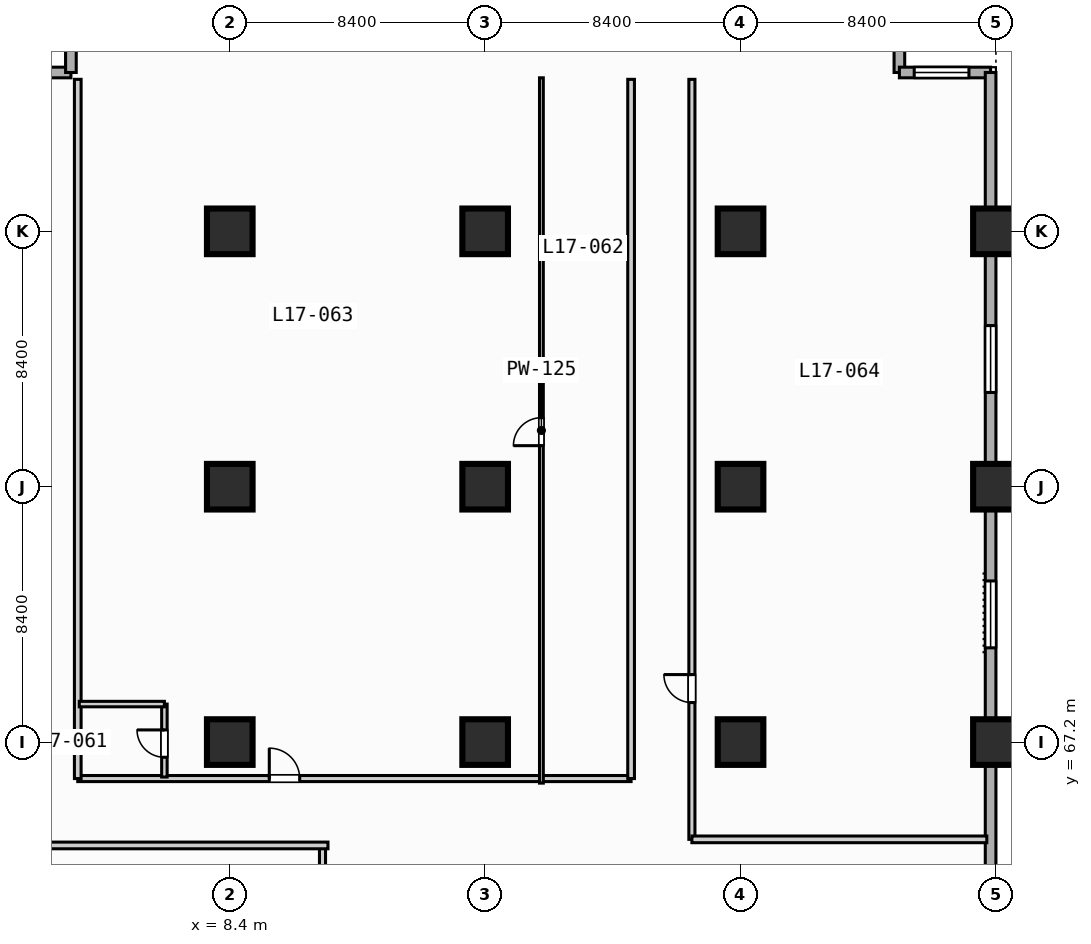
"""IFC4 building model, lengths in metres.
Left out: names, types, materials, properties, quantities, classifications, styles, units other than length and angle.
Written with IfcOpenShell. Run it as: python <this file> out.ifc"""

import sys

from ifc_helpers import new_model, si_unit, direction, frame, frame_2d, origin, origin_2d, place, context, subcontext, project, spatial, rectangle, extrude, element, fill, save


model = new_model("IFC4")
c1 = context("Model", 3, precision=1e-05, world=origin(), true_north=direction((0.0, 1.0)))
c2 = subcontext(c1, "Body", "Model", "MODEL_VIEW")
j1 = project(units=[si_unit("LENGTHUNIT", "METRE"), si_unit("PLANEANGLEUNIT", "RADIAN")], contexts=[c1])
p1 = place(None, origin())
s1 = spatial("IfcSite", under=j1, at=p1, CompositionType="ELEMENT")
p2 = place(p1, origin())
s2 = spatial("IfcBuilding", under=s1, at=p2, CompositionType="ELEMENT")
p3 = place(p2, frame((0.0, 0.0, 73.8)))
s3 = spatial("IfcBuildingStorey", under=s2, at=p3, CompositionType="ELEMENT", Elevation=73.8)
for number, where, z_axis, x_axis in (
    (1, (8.4, 67.2, 0.0), (0.0, 0.0, 1.0), (1.0, 0.0, 0.0)),
    (2, (8.4, 75.6, 0.0), (0.0, 0.0, 1.0), (1.0, 0.0, 0.0)),
    (3, (8.4, 84.0, 0.0), (0.0, 0.0, 1.0), (1.0, 0.0, 0.0)),
    (4, (16.8, 67.2, 0.0), (0.0, 0.0, 1.0), (1.0, 0.0, 0.0)),
    (5, (16.8, 75.6, 0.0), (0.0, 0.0, 1.0), (1.0, 0.0, 0.0)),
    (6, (16.8, 84.0, 0.0), (0.0, 0.0, 1.0), (1.0, 0.0, 0.0)),
    (7, (25.2, 67.2, 0.0), (0.0, 0.0, 1.0), (1.0, 0.0, 0.0)),
    (8, (25.2, 75.6, 0.0), (0.0, 0.0, 1.0), (1.0, 0.0, 0.0)),
    (9, (25.2, 84.0, 0.0), (0.0, 0.0, 1.0), (1.0, 0.0, 0.0)),
    (10, (33.6, 67.2, 0.0), (0.0, 0.0, 1.0), (1.0, 0.0, 0.0)),
    (11, (33.6, 75.6, 0.0), (0.0, 0.0, 1.0), (1.0, 0.0, 0.0)),
    (12, (33.6, 84.0, 0.0), (0.0, 0.0, 1.0), (1.0, 0.0, 0.0)),
):
    element("IfcColumn", number, at=place(p3, frame(where, z_axis=z_axis, x_axis=x_axis)), inside=s3, PredefinedType="COLUMN", context=c2, shape_type="SweptSolid", body=[
        extrude(rectangle(XDim=1.5, YDim=1.5, at=origin_2d()), origin(), (0.0, 0.0, 1.0), 3.8),
    ])
for number, where, z_axis, x_axis in (
    (13, (0.175, 89.225, 0.0), (0.0, 0.0, 1.0), (1.0, 0.0, 0.0)),
    (14, (3.175, 89.225, 0.0), (0.0, 0.0, 1.0), (0.0, 1.0, 0.0)),
    (15, (30.425, 92.225, 0.0), (0.0, 0.0, 1.0), (0.0, -1.0, 0.0)),
):
    element("IfcWall", number, at=place(p3, frame(where, z_axis=z_axis, x_axis=x_axis)), inside=s3, PredefinedType="STANDARD", context=c2, shape_type="SweptSolid", body=[
        extrude(rectangle(XDim=3.0, YDim=0.35, at=frame_2d((1.5, 0.0))), origin(), (0.0, 0.0, 1.0), 3.55),
    ])
p4 = place(p3, frame((30.425, 89.225, 0.0), z_axis=(0.0, 0.0, 1.0), x_axis=(1.0, 0.0, 0.0)))
e16 = element("IfcWall", 16, at=p4, inside=s3, PredefinedType="STANDARD", context=c2, shape_type="SweptSolid", body=[
    extrude(rectangle(XDim=3.0, YDim=0.35, at=frame_2d((1.5, 0.0))), origin(), (0.0, 0.0, 1.0), 3.55),
])
p5 = place(p4, frame((0.488, 0.0, 0.85)))
e17 = element("IfcOpeningElement", 17, at=p5, cuts=e16, PredefinedType="OPENING", context=c2, shape_type="SweptSolid", body=[
    extrude(rectangle(XDim=1.8, YDim=1.8, at=frame_2d((0.9, 0.9))), frame((0.0, 0.185, 0.0), z_axis=(0.0, -1.0, 0.0), x_axis=(1.0, 0.0, 0.0)), (0.0, 0.0, 1.0), 0.37),
])
p6 = place(p3, frame((33.425, 89.225, 0.0), z_axis=(0.0, 0.0, 1.0), x_axis=(0.0, -1.0, 0.0)))
e18 = element("IfcWall", 18, at=p6, inside=s3, PredefinedType="STANDARD", context=c2, shape_type="SweptSolid", body=[
    extrude(rectangle(XDim=55.8, YDim=0.35, at=frame_2d((27.9, 0.0))), origin(), (0.0, 0.0, 1.0), 3.55),
])
p7 = place(p6, frame((16.725, 0.0, 0.85)))
e19 = element("IfcOpeningElement", 19, at=p7, cuts=e18, PredefinedType="OPENING", context=c2, shape_type="SweptSolid", body=[
    extrude(rectangle(XDim=2.2, YDim=1.8, at=frame_2d((1.1, 0.9))), frame((0.0, 0.185, 0.0), z_axis=(0.0, -1.0, 0.0), x_axis=(1.0, 0.0, 0.0)), (0.0, 0.0, 1.0), 0.37),
])
p8 = place(p6, frame((8.325, 0.0, 0.85)))
e20 = element("IfcOpeningElement", 20, at=p8, cuts=e18, PredefinedType="OPENING", context=c2, shape_type="SweptSolid", body=[
    extrude(rectangle(XDim=2.2, YDim=1.8, at=frame_2d((1.1, 0.9))), frame((0.0, 0.185, 0.0), z_axis=(0.0, -1.0, 0.0), x_axis=(1.0, 0.0, 0.0)), (0.0, 0.0, 1.0), 0.37),
])
p9 = place(p3, frame((11.45, 3.4, 0.0), z_axis=(0.0, 0.0, 1.0), x_axis=(0.0, 1.0, 0.0)))
e21 = element("IfcWall", 21, at=p9, inside=s3, PredefinedType="PARTITIONING", context=c2, shape_type="SweptSolid", body=[
    extrude(rectangle(XDim=60.4, YDim=0.2, at=frame_2d((30.2, 0.0))), origin(), (0.0, 0.0, 1.0), 3.55),
])
p10 = place(p9, frame((4.465, 0.0, 0.0)))
e22 = element("IfcOpeningElement", 22, at=p10, cuts=e21, PredefinedType="OPENING", context=c2, shape_type="SweptSolid", body=[
    extrude(rectangle(XDim=1.0, YDim=2.15, at=frame_2d((0.5, 1.075))), frame((0.0, 0.11, 0.0), z_axis=(0.0, -1.0, 0.0), x_axis=(1.0, 0.0, 0.0)), (0.0, 0.0, 1.0), 0.22),
])
p11 = place(p9, frame((14.665, 0.0, 0.0)))
e23 = element("IfcOpeningElement", 23, at=p11, cuts=e21, PredefinedType="OPENING", context=c2, shape_type="SweptSolid", body=[
    extrude(rectangle(XDim=1.0, YDim=2.15, at=frame_2d((0.5, 1.075))), frame((0.0, 0.11, 0.0), z_axis=(0.0, -1.0, 0.0), x_axis=(1.0, 0.0, 0.0)), (0.0, 0.0, 1.0), 0.22),
])
p12 = place(p9, frame((22.535, 0.0, 0.0)))
e24 = element("IfcOpeningElement", 24, at=p12, cuts=e21, PredefinedType="OPENING", context=c2, shape_type="SweptSolid", body=[
    extrude(rectangle(XDim=1.0, YDim=2.15, at=frame_2d((0.5, 1.075))), frame((0.0, 0.11, 0.0), z_axis=(0.0, -1.0, 0.0), x_axis=(1.0, 0.0, 0.0)), (0.0, 0.0, 1.0), 0.22),
])
p13 = place(p9, frame((31.16, 0.0, 0.0)))
e25 = element("IfcOpeningElement", 25, at=p13, cuts=e21, PredefinedType="OPENING", context=c2, shape_type="SweptSolid", body=[
    extrude(rectangle(XDim=1.0, YDim=2.15, at=frame_2d((0.5, 1.075))), frame((0.0, 0.11, 0.0), z_axis=(0.0, -1.0, 0.0), x_axis=(1.0, 0.0, 0.0)), (0.0, 0.0, 1.0), 0.22),
])
p14 = place(p9, frame((42.36, 0.0, 0.0)))
e26 = element("IfcOpeningElement", 26, at=p14, cuts=e21, PredefinedType="OPENING", context=c2, shape_type="SweptSolid", body=[
    extrude(rectangle(XDim=1.0, YDim=2.15, at=frame_2d((0.5, 1.075))), frame((0.0, 0.11, 0.0), z_axis=(0.0, -1.0, 0.0), x_axis=(1.0, 0.0, 0.0)), (0.0, 0.0, 1.0), 0.22),
])
p15 = place(p9, frame((56.065, 0.0, 0.0)))
e27 = element("IfcOpeningElement", 27, at=p15, cuts=e21, PredefinedType="OPENING", context=c2, shape_type="SweptSolid", body=[
    extrude(rectangle(XDim=1.0, YDim=2.15, at=frame_2d((0.5, 1.075))), frame((0.0, 0.11, 0.0), z_axis=(0.0, -1.0, 0.0), x_axis=(1.0, 0.0, 0.0)), (0.0, 0.0, 1.0), 0.22),
])
p16 = place(p3, frame((0.2, 63.8, 0.0), z_axis=(0.0, 0.0, 1.0), x_axis=(1.0, 0.0, 0.0)))
e28 = element("IfcWall", 28, at=p16, inside=s3, PredefinedType="PARTITIONING", context=c2, shape_type="SweptSolid", body=[
    extrude(rectangle(XDim=11.43, YDim=0.22, at=frame_2d((5.715, 0.0))), origin(), (0.0, 0.0, 1.0), 3.55),
])
p17 = place(p3, frame((3.4, 66.0, 0.0), z_axis=(0.0, 0.0, 1.0), x_axis=(1.0, 0.0, 0.0)))
e29 = element("IfcWall", 29, at=p17, inside=s3, PredefinedType="PARTITIONING", context=c2, shape_type="SweptSolid", body=[
    extrude(rectangle(XDim=18.2, YDim=0.2, at=frame_2d((9.1, 0.0))), origin(), (0.0, 0.0, 1.0), 3.55),
])
p18 = place(p17, frame((6.3, 0.0, 0.0)))
e30 = element("IfcOpeningElement", 30, at=p18, cuts=e29, PredefinedType="OPENING", context=c2, shape_type="SweptSolid", body=[
    extrude(rectangle(XDim=1.0, YDim=2.15, at=frame_2d((0.5, 1.075))), frame((0.0, 0.11, 0.0), z_axis=(0.0, -1.0, 0.0), x_axis=(1.0, 0.0, 0.0)), (0.0, 0.0, 1.0), 0.22),
])
for number, where, z_axis, x_axis in (
    (31, (21.6, 66.0, 0.0), (0.0, 0.0, 1.0), (0.0, 1.0, 0.0)),
    (32, (3.4, 66.0, 0.0), (0.0, 0.0, 1.0), (0.0, 1.0, 0.0)),
):
    element("IfcWall", number, at=place(p3, frame(where, z_axis=z_axis, x_axis=x_axis)), inside=s3, PredefinedType="PARTITIONING", context=c2, shape_type="SweptSolid", body=[
        extrude(rectangle(XDim=23.0, YDim=0.22, at=frame_2d((11.5, 0.0))), origin(), (0.0, 0.0, 1.0), 3.55),
    ])
p19 = place(p3, frame((6.25, 66.05, 0.0), z_axis=(0.0, 0.0, 1.0), x_axis=(0.0, 1.0, 0.0)))
e33 = element("IfcWall", 33, at=p19, inside=s3, PredefinedType="PLUMBINGWALL", context=c2, shape_type="SweptSolid", body=[
    extrude(rectangle(XDim=2.4, YDim=0.18, at=frame_2d((1.2, 0.0))), origin(), (0.0, 0.0, 1.0), 3.55),
])
p20 = place(p19, frame((0.65, 0.0, 0.0)))
e34 = element("IfcOpeningElement", 34, at=p20, cuts=e33, PredefinedType="OPENING", context=c2, shape_type="SweptSolid", body=[
    extrude(rectangle(XDim=0.9, YDim=2.1, at=frame_2d((0.45, 1.05))), frame((0.0, 0.1, 0.0), z_axis=(0.0, -1.0, 0.0), x_axis=(1.0, 0.0, 0.0)), (0.0, 0.0, 1.0), 0.2),
])
p21 = place(p3, frame((3.45, 68.45, 0.0), z_axis=(0.0, 0.0, 1.0), x_axis=(1.0, 0.0, 0.0)))
e35 = element("IfcWall", 35, at=p21, inside=s3, PredefinedType="PLUMBINGWALL", context=c2, shape_type="SweptSolid", body=[
    extrude(rectangle(XDim=2.8, YDim=0.18, at=frame_2d((1.4, 0.0))), origin(), (0.0, 0.0, 1.0), 3.55),
])
p22 = place(p3, frame((18.65, 65.85, 0.0), z_axis=(0.0, 0.0, 1.0), x_axis=(0.0, 1.0, 0.0)))
e36 = element("IfcWall", 36, at=p22, inside=s3, PredefinedType="PARTITIONING", context=c2, shape_type="SweptSolid", body=[
    extrude(rectangle(XDim=23.2, YDim=0.125, at=frame_2d((11.6, 0.0))), origin(), (0.0, 0.0, 1.0), 3.55),
])
p23 = place(p22, frame((11.1, 0.0, 0.0)))
e37 = element("IfcOpeningElement", 37, at=p23, cuts=e36, PredefinedType="OPENING", context=c2, shape_type="SweptSolid", body=[
    extrude(rectangle(XDim=0.92, YDim=2.1, at=frame_2d((0.46, 1.05))), frame((0.0, 0.073, 0.0), z_axis=(0.0, -1.0, 0.0), x_axis=(1.0, 0.0, 0.0)), (0.0, 0.0, 1.0), 0.145),
])
p24 = place(p3, frame((23.6, 64.0, 0.0), z_axis=(0.0, 0.0, 1.0), x_axis=(0.0, 1.0, 0.0)))
e38 = element("IfcWall", 38, at=p24, inside=s3, PredefinedType="PARTITIONING", context=c2, shape_type="SweptSolid", body=[
    extrude(rectangle(XDim=25.0, YDim=0.2, at=frame_2d((12.5, 0.0))), origin(), (0.0, 0.0, 1.0), 3.55),
])
p25 = place(p24, frame((4.5, 0.0, 0.0)))
e39 = element("IfcOpeningElement", 39, at=p25, cuts=e38, PredefinedType="OPENING", context=c2, shape_type="SweptSolid", body=[
    extrude(rectangle(XDim=0.92, YDim=2.1, at=frame_2d((0.46, 1.05))), frame((0.0, 0.11, 0.0), z_axis=(0.0, -1.0, 0.0), x_axis=(1.0, 0.0, 0.0)), (0.0, 0.0, 1.0), 0.22),
])
p26 = place(p3, frame((23.6, 64.0, 0.0), z_axis=(0.0, 0.0, 1.0), x_axis=(1.0, 0.0, 0.0)))
e40 = element("IfcWall", 40, at=p26, inside=s3, PredefinedType="PARTITIONING", context=c2, shape_type="SweptSolid", body=[
    extrude(rectangle(XDim=9.7, YDim=0.22, at=frame_2d((4.85, 0.0))), origin(), (0.0, 0.0, 1.0), 3.55),
])
p27 = place(p5, origin())
e41 = element("IfcWindow", 41, at=p27, inside=s3, PartitioningType="SINGLE_PANEL", PredefinedType="WINDOW", context=c2, shape_type="SweptSolid", body=[
    extrude(rectangle(XDim=1.8, YDim=1.8, at=frame_2d((0.9, 0.9))), frame((0.0, 0.03, 0.0), z_axis=(0.0, -1.0, 0.0), x_axis=(1.0, 0.0, 0.0)), (0.0, 0.0, 1.0), 0.06),
])
fill(e17, e41)
p28 = place(p7, origin())
e42 = element("IfcWindow", 42, at=p28, inside=s3, PartitioningType="SINGLE_PANEL", PredefinedType="WINDOW", context=c2, shape_type="SweptSolid", body=[
    extrude(rectangle(XDim=2.2, YDim=1.8, at=frame_2d((1.1, 0.9))), frame((0.0, 0.03, 0.0), z_axis=(0.0, -1.0, 0.0), x_axis=(1.0, 0.0, 0.0)), (0.0, 0.0, 1.0), 0.06),
])
fill(e19, e42)
p29 = place(p8, origin())
e43 = element("IfcWindow", 43, at=p29, inside=s3, PartitioningType="SINGLE_PANEL", PredefinedType="WINDOW", context=c2, shape_type="SweptSolid", body=[
    extrude(rectangle(XDim=2.2, YDim=1.8, at=frame_2d((1.1, 0.9))), frame((0.0, 0.03, 0.0), z_axis=(0.0, -1.0, 0.0), x_axis=(1.0, 0.0, 0.0)), (0.0, 0.0, 1.0), 0.06),
])
fill(e20, e43)
p30 = place(p18, origin())
e44 = element("IfcDoor", 44, at=p30, inside=s3, OperationType="SINGLE_SWING_LEFT", PredefinedType="DOOR", context=c2, shape_type="SweptSolid", body=[
    extrude(rectangle(XDim=1.0, YDim=2.15, at=frame_2d((0.5, 1.075))), frame((0.0, 0.025, 0.0), z_axis=(0.0, -1.0, 0.0), x_axis=(1.0, 0.0, 0.0)), (0.0, 0.0, 1.0), 0.05),
])
fill(e30, e44)
p31 = place(p20, origin())
e45 = element("IfcDoor", 45, at=p31, inside=s3, OperationType="SINGLE_SWING_RIGHT", PredefinedType="DOOR", context=c2, shape_type="SweptSolid", body=[
    extrude(rectangle(XDim=0.9, YDim=2.1, at=frame_2d((0.45, 1.05))), frame((0.0, 0.025, 0.0), z_axis=(0.0, -1.0, 0.0), x_axis=(1.0, 0.0, 0.0)), (0.0, 0.0, 1.0), 0.05),
])
fill(e34, e45)
p32 = place(p23, origin())
e46 = element("IfcDoor", 46, at=p32, inside=s3, OperationType="SINGLE_SWING_LEFT", PredefinedType="DOOR", context=c2, shape_type="SweptSolid", body=[
    extrude(rectangle(XDim=0.92, YDim=2.1, at=frame_2d((0.46, 1.05))), frame((0.0, 0.025, 0.0), z_axis=(0.0, -1.0, 0.0), x_axis=(1.0, 0.0, 0.0)), (0.0, 0.0, 1.0), 0.05),
])
fill(e37, e46)
p33 = place(p25, origin())
e47 = element("IfcDoor", 47, at=p33, inside=s3, OperationType="SINGLE_SWING_RIGHT", PredefinedType="DOOR", context=c2, shape_type="SweptSolid", body=[
    extrude(rectangle(XDim=0.92, YDim=2.1, at=frame_2d((0.46, 1.05))), frame((0.0, 0.025, 0.0), z_axis=(0.0, -1.0, 0.0), x_axis=(1.0, 0.0, 0.0)), (0.0, 0.0, 1.0), 0.05),
])
fill(e39, e47)
save(model, sys.argv[1])
